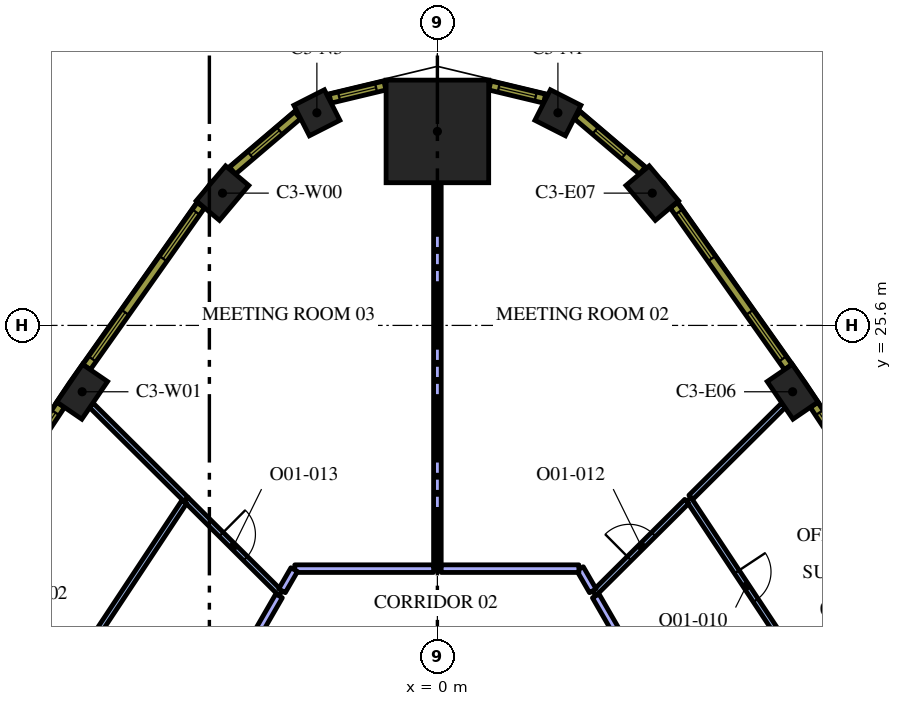
"""IFC4 building model, lengths in metres.
Left out: names, types, materials, properties, quantities, classifications, styles, units other than length and angle.
Written with IfcOpenShell. Run it as: python <this file> out.ifc"""

import sys

from ifc_helpers import new_model, si_unit, direction, frame, frame_2d, origin, origin_2d, place, context, subcontext, project, spatial, rectangle, extrude, element, fill, save


model = new_model("IFC4")
c1 = context("Model", 3, precision=1e-05, world=origin(), true_north=direction((0.0, 1.0)))
c2 = subcontext(c1, "Body", "Model", "MODEL_VIEW")
j1 = project(units=[si_unit("LENGTHUNIT", "METRE"), si_unit("PLANEANGLEUNIT", "RADIAN")], contexts=[c1])
p1 = place(None, origin())
s1 = spatial("IfcSite", under=j1, at=p1, CompositionType="ELEMENT")
p2 = place(p1, origin())
s2 = spatial("IfcBuilding", under=s1, at=p2, CompositionType="ELEMENT")
p3 = place(p2, frame((0.0, 0.0, 145.8)))
s3 = spatial("IfcBuildingStorey", under=s2, at=p3, CompositionType="ELEMENT", Elevation=145.8)
p4 = place(p3, frame((0.0, 30.704, 0.0), z_axis=(0.0, 0.0, 1.0), x_axis=(0.0, 1.0, 0.0)))
e1 = element("IfcColumn", 1, at=p4, inside=s3, PredefinedType="COLUMN", context=c2, shape_type="SweptSolid", body=[
    extrude(rectangle(XDim=2.7, YDim=2.7, at=origin_2d()), origin(), (0.0, 0.0, 1.0), 4.2),
])
for number, where, z_axis, x_axis in (
    (2, (9.348, 23.854, 0.0), (0.0, 0.0, 1.0), (-0.565, 0.825, 0.0)),
    (3, (5.654, 29.081, 0.0), (0.0, 0.0, 1.0), (-0.644, 0.765, 0.0)),
):
    element("IfcColumn", number, at=place(p3, frame(where, z_axis=z_axis, x_axis=x_axis)), inside=s3, PredefinedType="COLUMN", context=c2, shape_type="SweptSolid", body=[
        extrude(rectangle(XDim=1.2, YDim=0.8, at=origin_2d()), origin(), (0.0, 0.0, 1.0), 4.2),
    ])
for number, where, z_axis, x_axis in (
    (4, (3.171, 31.195, 0.0), (0.0, 0.0, 1.0), (-0.891, 0.453, 0.0)),
    (5, (-3.171, 31.195, 0.0), (0.0, 0.0, 1.0), (-0.891, -0.453, 0.0)),
):
    element("IfcColumn", number, at=place(p3, frame(where, z_axis=z_axis, x_axis=x_axis)), inside=s3, PredefinedType="COLUMN", context=c2, shape_type="SweptSolid", body=[
        extrude(rectangle(XDim=0.9, YDim=0.9, at=origin_2d()), origin(), (0.0, 0.0, 1.0), 4.2),
    ])
for number, where, z_axis, x_axis in (
    (6, (-5.654, 29.081, 0.0), (0.0, 0.0, 1.0), (-0.644, -0.765, 0.0)),
    (7, (-9.348, 23.854, 0.0), (0.0, 0.0, 1.0), (-0.565, -0.825, 0.0)),
):
    element("IfcColumn", number, at=place(p3, frame(where, z_axis=z_axis, x_axis=x_axis)), inside=s3, PredefinedType="COLUMN", context=c2, shape_type="SweptSolid", body=[
        extrude(rectangle(XDim=1.2, YDim=0.8, at=origin_2d()), origin(), (0.0, 0.0, 1.0), 4.2),
    ])
p5 = place(p3, frame((6.616, 21.024, 0.0), z_axis=(0.0, 0.0, 1.0), x_axis=(0.551915124006, -0.833900291338, 0.0)))
e8 = element("IfcWall", 8, at=p5, inside=s3, PredefinedType="PARTITIONING", context=c2, shape_type="SweptSolid", body=[
    extrude(rectangle(XDim=5.488, YDim=0.15, at=frame_2d((2.744, 0.0))), origin(), (0.0, 0.0, 1.0), 3.15),
])
p6 = place(p5, frame((2.288, 0.0, 0.0)))
e9 = element("IfcOpeningElement", 9, at=p6, cuts=e8, PredefinedType="OPENING", context=c2, shape_type="SweptSolid", body=[
    extrude(rectangle(XDim=0.9, YDim=2.1, at=frame_2d((0.45, 1.05))), frame((0.0, 0.085, 0.0), z_axis=(0.0, -1.0, 0.0), x_axis=(1.0, 0.0, 0.0)), (0.0, 0.0, 1.0), 0.17),
])
p7 = place(p3, frame((6.67, 21.078, 0.0), z_axis=(0.0, 0.0, 1.0), x_axis=(0.709236178776, 0.704970951681, 0.0)))
e10 = element("IfcWall", 10, at=p7, inside=s3, PredefinedType="PARTITIONING", context=c2, shape_type="SweptSolid", body=[
    extrude(rectangle(XDim=3.434, YDim=0.15, at=frame_2d((1.717, 0.0))), origin(), (0.0, 0.0, 1.0), 3.15),
])
p8 = place(p3, frame((4.128, 18.55, 0.0), z_axis=(0.0, 0.0, 1.0), x_axis=(0.709237676072, 0.704969445324, 0.0)))
e11 = element("IfcWall", 11, at=p8, inside=s3, PredefinedType="PARTITIONING", context=c2, shape_type="SweptSolid", body=[
    extrude(rectangle(XDim=3.432, YDim=0.15, at=frame_2d((1.716, 0.0))), origin(), (0.0, 0.0, 1.0), 3.15),
])
p9 = place(p8, frame((1.3, 0.0, 0.0)))
e12 = element("IfcOpeningElement", 12, at=p9, cuts=e11, PredefinedType="OPENING", context=c2, shape_type="SweptSolid", body=[
    extrude(rectangle(XDim=0.9, YDim=2.1, at=frame_2d((0.45, 1.05))), frame((0.0, 0.085, 0.0), z_axis=(0.0, -1.0, 0.0), x_axis=(1.0, 0.0, 0.0)), (0.0, 0.0, 1.0), 0.17),
])
p10 = place(p3, frame((8.611, 10.785, 0.0), z_axis=(0.0, 0.0, 1.0), x_axis=(-0.499987928593, 0.866032373102, 0.0)))
e13 = element("IfcWall", 13, at=p10, inside=s3, PredefinedType="PARTITIONING", context=c2, shape_type="SweptSolid", body=[
    extrude(rectangle(XDim=8.889, YDim=0.2, at=frame_2d((4.445, 0.0))), origin(), (0.0, 0.0, 1.0), 3.15),
])
p11 = place(p3, frame((0.0, 19.2, 0.0), z_axis=(0.0, 0.0, 1.0), x_axis=(0.0, 1.0, 0.0)))
e14 = element("IfcWall", 14, at=p11, inside=s3, PredefinedType="PARTITIONING", context=c2, shape_type="SweptSolid", body=[
    extrude(rectangle(XDim=10.154, YDim=0.2, at=frame_2d((5.077, 0.0))), origin(), (0.0, 0.0, 1.0), 3.15),
])
p12 = place(p3, frame((4.089, 18.617, 0.0), z_axis=(0.0, 0.0, 1.0), x_axis=(-0.500120377296, 0.865955892764, 0.0)))
e15 = element("IfcWall", 15, at=p12, inside=s3, PredefinedType="PARTITIONING", context=c2, shape_type="SweptSolid", body=[
    extrude(rectangle(XDim=0.673, YDim=0.2, at=frame_2d((0.336, 0.0))), origin(), (0.0, 0.0, 1.0), 3.15),
])
p13 = place(p3, frame((3.723, 19.2, 0.0), z_axis=(0.0, 0.0, 1.0), x_axis=(-1.0, 0.0, 0.0)))
e16 = element("IfcWall", 16, at=p13, inside=s3, PredefinedType="PARTITIONING", context=c2, shape_type="SweptSolid", body=[
    extrude(rectangle(XDim=3.623, YDim=0.2, at=frame_2d((1.812, 0.0))), origin(), (0.0, 0.0, 1.0), 3.15),
])
p14 = place(p3, frame((-6.613, 21.021, 0.0), z_axis=(0.0, 0.0, 1.0), x_axis=(-0.709222036241, 0.704985179497, 0.0)))
e17 = element("IfcWall", 17, at=p14, inside=s3, PredefinedType="PARTITIONING", context=c2, shape_type="SweptSolid", body=[
    extrude(rectangle(XDim=3.515, YDim=0.15, at=frame_2d((1.757, 0.0))), origin(), (0.0, 0.0, 1.0), 3.15),
])
p15 = place(p3, frame((-6.619, 21.027, 0.0), z_axis=(0.0, 0.0, 1.0), x_axis=(0.709188943058, -0.705018470002, 0.0)))
e18 = element("IfcWall", 18, at=p15, inside=s3, PredefinedType="PARTITIONING", context=c2, shape_type="SweptSolid", body=[
    extrude(rectangle(XDim=3.512, YDim=0.15, at=frame_2d((1.756, 0.0))), origin(), (0.0, 0.0, 1.0), 3.15),
])
p16 = place(p15, frame((1.312, 0.0, 0.0)))
e19 = element("IfcOpeningElement", 19, at=p16, cuts=e18, PredefinedType="OPENING", context=c2, shape_type="SweptSolid", body=[
    extrude(rectangle(XDim=0.9, YDim=2.1, at=frame_2d((0.45, 1.05))), frame((0.0, 0.085, 0.0), z_axis=(0.0, -1.0, 0.0), x_axis=(1.0, 0.0, 0.0)), (0.0, 0.0, 1.0), 0.17),
])
p17 = place(p3, frame((-0.1, 19.2, 0.0), z_axis=(0.0, 0.0, 1.0), x_axis=(-1.0, 0.0, 0.0)))
e20 = element("IfcWall", 20, at=p17, inside=s3, PredefinedType="PARTITIONING", context=c2, shape_type="SweptSolid", body=[
    extrude(rectangle(XDim=3.653, YDim=0.2, at=frame_2d((1.826, 0.0))), origin(), (0.0, 0.0, 1.0), 3.15),
])
p18 = place(p3, frame((-3.768, 19.174, 0.0), z_axis=(0.0, 0.0, 1.0), x_axis=(-0.499897828833, -0.8660843843, 0.0)))
e21 = element("IfcWall", 21, at=p18, inside=s3, PredefinedType="PARTITIONING", context=c2, shape_type="SweptSolid", body=[
    extrude(rectangle(XDim=0.643, YDim=0.2, at=frame_2d((0.321, 0.0))), origin(), (0.0, 0.0, 1.0), 3.15),
])
p19 = place(p3, frame((-6.658, 20.96, 0.0), z_axis=(0.0, 0.0, 1.0), x_axis=(-0.551907039463, -0.833905642019, 0.0)))
e22 = element("IfcWall", 22, at=p19, inside=s3, PredefinedType="PARTITIONING", context=c2, shape_type="SweptSolid", body=[
    extrude(rectangle(XDim=5.412, YDim=0.15, at=frame_2d((2.706, 0.0))), origin(), (0.0, 0.0, 1.0), 3.15),
])
p20 = place(p3, frame((-4.167, 18.483, 0.0), z_axis=(0.0, 0.0, 1.0), x_axis=(-0.499974340325, -0.866040217898, 0.0)))
e23 = element("IfcWall", 23, at=p20, inside=s3, PredefinedType="PARTITIONING", context=c2, shape_type="SweptSolid", body=[
    extrude(rectangle(XDim=8.894, YDim=0.2, at=frame_2d((4.447, 0.0))), origin(), (0.0, 0.0, 1.0), 3.15),
])
p21 = place(p3, frame((12.783, 19.171, 0.0), z_axis=(0.0, 0.0, 1.0), x_axis=(-0.551892811511, 0.833915058386, 0.0)))
e24 = element("IfcWall", 24, at=p21, inside=s3, PredefinedType="SOLIDWALL", context=c2, shape_type="SweptSolid", body=[
    extrude(rectangle(XDim=5.204, YDim=0.24, at=frame_2d((2.602, 0.0))), origin(), (0.0, 0.0, 1.0), 3.95),
])
p22 = place(p21, frame((0.248, 0.0, 0.9)))
e25 = element("IfcOpeningElement", 25, at=p22, cuts=e24, PredefinedType="OPENING", context=c2, shape_type="SweptSolid", body=[
    extrude(rectangle(XDim=1.5, YDim=2.55, at=frame_2d((0.75, 1.275))), frame((0.0, 0.13, 0.0), z_axis=(0.0, -1.0, 0.0), x_axis=(1.0, 0.0, 0.0)), (0.0, 0.0, 1.0), 0.26),
])
p23 = place(p21, frame((3.455, 0.0, 0.9)))
e26 = element("IfcOpeningElement", 26, at=p23, cuts=e24, PredefinedType="OPENING", context=c2, shape_type="SweptSolid", body=[
    extrude(rectangle(XDim=1.5, YDim=2.55, at=frame_2d((0.75, 1.275))), frame((0.0, 0.13, 0.0), z_axis=(0.0, -1.0, 0.0), x_axis=(1.0, 0.0, 0.0)), (0.0, 0.0, 1.0), 0.26),
])
p24 = place(p3, frame((9.231, 24.504, 0.0), z_axis=(0.0, 0.0, 1.0), x_axis=(-0.577115207679, 0.816662743772, 0.0)))
e27 = element("IfcWall", 27, at=p24, inside=s3, PredefinedType="SOLIDWALL", context=c2, shape_type="SweptSolid", body=[
    extrude(rectangle(XDim=5.213, YDim=0.24, at=frame_2d((2.606, 0.0))), origin(), (0.0, 0.0, 1.0), 3.95),
])
p25 = place(p24, frame((0.261, 0.0, 0.9)))
e28 = element("IfcOpeningElement", 28, at=p25, cuts=e27, PredefinedType="OPENING", context=c2, shape_type="SweptSolid", body=[
    extrude(rectangle(XDim=1.5, YDim=2.55, at=frame_2d((0.75, 1.275))), frame((0.0, 0.13, 0.0), z_axis=(0.0, -1.0, 0.0), x_axis=(1.0, 0.0, 0.0)), (0.0, 0.0, 1.0), 0.26),
])
p26 = place(p24, frame((3.492, 0.0, 0.9)))
e29 = element("IfcOpeningElement", 29, at=p26, cuts=e27, PredefinedType="OPENING", context=c2, shape_type="SweptSolid", body=[
    extrude(rectangle(XDim=1.5, YDim=2.55, at=frame_2d((0.75, 1.275))), frame((0.0, 0.13, 0.0), z_axis=(0.0, -1.0, 0.0), x_axis=(1.0, 0.0, 0.0)), (0.0, 0.0, 1.0), 0.26),
])
p27 = place(p3, frame((5.392, 29.672, 0.0), z_axis=(0.0, 0.0, 1.0), x_axis=(-0.761419744247, 0.648259186645, 0.0)))
e30 = element("IfcWall", 30, at=p27, inside=s3, PredefinedType="SOLIDWALL", context=c2, shape_type="SweptSolid", body=[
    extrude(rectangle(XDim=2.25, YDim=0.24, at=frame_2d((1.125, 0.0))), origin(), (0.0, 0.0, 1.0), 3.95),
])
p28 = place(p27, frame((0.625, 0.0, 0.9)))
e31 = element("IfcOpeningElement", 31, at=p28, cuts=e30, PredefinedType="OPENING", context=c2, shape_type="SweptSolid", body=[
    extrude(rectangle(XDim=1.0, YDim=2.55, at=frame_2d((0.5, 1.275))), frame((0.0, 0.13, 0.0), z_axis=(0.0, -1.0, 0.0), x_axis=(1.0, 0.0, 0.0)), (0.0, 0.0, 1.0), 0.26),
])
p29 = place(p3, frame((2.821, 31.566, 0.0), z_axis=(0.0, 0.0, 1.0), x_axis=(-0.972479955788, 0.232986556673, 0.0)))
e32 = element("IfcWall", 32, at=p29, inside=s3, PredefinedType="SOLIDWALL", context=c2, shape_type="SweptSolid", body=[
    extrude(rectangle(XDim=1.482, YDim=0.24, at=frame_2d((0.741, 0.0))), origin(), (0.0, 0.0, 1.0), 3.95),
])
p30 = place(p29, frame((0.241, 0.0, 0.9)))
e33 = element("IfcOpeningElement", 33, at=p30, cuts=e32, PredefinedType="OPENING", context=c2, shape_type="SweptSolid", body=[
    extrude(rectangle(XDim=1.0, YDim=2.55, at=frame_2d((0.5, 1.275))), frame((0.0, 0.13, 0.0), z_axis=(0.0, -1.0, 0.0), x_axis=(1.0, 0.0, 0.0)), (0.0, 0.0, 1.0), 0.26),
])
p31 = place(p3, frame((-1.38, 31.912, 0.0), z_axis=(0.0, 0.0, 1.0), x_axis=(-0.972479955788, -0.232986556673, 0.0)))
e34 = element("IfcWall", 34, at=p31, inside=s3, PredefinedType="SOLIDWALL", context=c2, shape_type="SweptSolid", body=[
    extrude(rectangle(XDim=1.482, YDim=0.24, at=frame_2d((0.741, 0.0))), origin(), (0.0, 0.0, 1.0), 3.95),
])
p32 = place(p31, frame((0.241, 0.0, 0.9)))
e35 = element("IfcOpeningElement", 35, at=p32, cuts=e34, PredefinedType="OPENING", context=c2, shape_type="SweptSolid", body=[
    extrude(rectangle(XDim=1.0, YDim=2.55, at=frame_2d((0.5, 1.275))), frame((0.0, 0.13, 0.0), z_axis=(0.0, -1.0, 0.0), x_axis=(1.0, 0.0, 0.0)), (0.0, 0.0, 1.0), 0.26),
])
p33 = place(p3, frame((-3.678, 31.131, 0.0), z_axis=(0.0, 0.0, 1.0), x_axis=(-0.761419744247, -0.648259186645, 0.0)))
e36 = element("IfcWall", 36, at=p33, inside=s3, PredefinedType="SOLIDWALL", context=c2, shape_type="SweptSolid", body=[
    extrude(rectangle(XDim=2.25, YDim=0.24, at=frame_2d((1.125, 0.0))), origin(), (0.0, 0.0, 1.0), 3.95),
])
p34 = place(p33, frame((0.625, 0.0, 0.9)))
e37 = element("IfcOpeningElement", 37, at=p34, cuts=e36, PredefinedType="OPENING", context=c2, shape_type="SweptSolid", body=[
    extrude(rectangle(XDim=1.0, YDim=2.55, at=frame_2d((0.5, 1.275))), frame((0.0, 0.13, 0.0), z_axis=(0.0, -1.0, 0.0), x_axis=(1.0, 0.0, 0.0)), (0.0, 0.0, 1.0), 0.26),
])
p35 = place(p3, frame((-6.223, 28.762, 0.0), z_axis=(0.0, 0.0, 1.0), x_axis=(-0.577115207679, -0.816662743772, 0.0)))
e38 = element("IfcWall", 38, at=p35, inside=s3, PredefinedType="SOLIDWALL", context=c2, shape_type="SweptSolid", body=[
    extrude(rectangle(XDim=5.213, YDim=0.24, at=frame_2d((2.606, 0.0))), origin(), (0.0, 0.0, 1.0), 3.95),
])
p36 = place(p35, frame((0.221, 0.0, 0.9)))
e39 = element("IfcOpeningElement", 39, at=p36, cuts=e38, PredefinedType="OPENING", context=c2, shape_type="SweptSolid", body=[
    extrude(rectangle(XDim=1.5, YDim=2.55, at=frame_2d((0.75, 1.275))), frame((0.0, 0.13, 0.0), z_axis=(0.0, -1.0, 0.0), x_axis=(1.0, 0.0, 0.0)), (0.0, 0.0, 1.0), 0.26),
])
p37 = place(p35, frame((3.452, 0.0, 0.9)))
e40 = element("IfcOpeningElement", 40, at=p37, cuts=e38, PredefinedType="OPENING", context=c2, shape_type="SweptSolid", body=[
    extrude(rectangle(XDim=1.5, YDim=2.55, at=frame_2d((0.75, 1.275))), frame((0.0, 0.13, 0.0), z_axis=(0.0, -1.0, 0.0), x_axis=(1.0, 0.0, 0.0)), (0.0, 0.0, 1.0), 0.26),
])
p38 = place(p3, frame((-9.911, 23.51, 0.0), z_axis=(0.0, 0.0, 1.0), x_axis=(-0.551892811511, -0.833915058386, 0.0)))
e41 = element("IfcWall", 41, at=p38, inside=s3, PredefinedType="SOLIDWALL", context=c2, shape_type="SweptSolid", body=[
    extrude(rectangle(XDim=5.204, YDim=0.24, at=frame_2d((2.602, 0.0))), origin(), (0.0, 0.0, 1.0), 3.95),
])
p39 = place(p38, frame((0.248, 0.0, 0.9)))
e42 = element("IfcOpeningElement", 42, at=p39, cuts=e41, PredefinedType="OPENING", context=c2, shape_type="SweptSolid", body=[
    extrude(rectangle(XDim=1.5, YDim=2.55, at=frame_2d((0.75, 1.275))), frame((0.0, 0.13, 0.0), z_axis=(0.0, -1.0, 0.0), x_axis=(1.0, 0.0, 0.0)), (0.0, 0.0, 1.0), 0.26),
])
p40 = place(p38, frame((3.455, 0.0, 0.9)))
e43 = element("IfcOpeningElement", 43, at=p40, cuts=e41, PredefinedType="OPENING", context=c2, shape_type="SweptSolid", body=[
    extrude(rectangle(XDim=1.5, YDim=2.55, at=frame_2d((0.75, 1.275))), frame((0.0, 0.13, 0.0), z_axis=(0.0, -1.0, 0.0), x_axis=(1.0, 0.0, 0.0)), (0.0, 0.0, 1.0), 0.26),
])
p41 = place(p6, origin())
e44 = element("IfcDoor", 44, at=p41, inside=s3, OperationType="SINGLE_SWING_LEFT", PredefinedType="DOOR", context=c2, shape_type="SweptSolid", body=[
    extrude(rectangle(XDim=0.9, YDim=2.1, at=frame_2d((0.45, 1.05))), frame((0.0, 0.025, 0.0), z_axis=(0.0, -1.0, 0.0), x_axis=(1.0, 0.0, 0.0)), (0.0, 0.0, 1.0), 0.05),
])
fill(e9, e44)
p42 = place(p9, origin())
e45 = element("IfcDoor", 45, at=p42, inside=s3, OperationType="SINGLE_SWING_RIGHT", PredefinedType="DOOR", context=c2, shape_type="SweptSolid", body=[
    extrude(rectangle(XDim=0.9, YDim=2.1, at=frame_2d((0.45, 1.05))), frame((0.0, 0.025, 0.0), z_axis=(0.0, -1.0, 0.0), x_axis=(1.0, 0.0, 0.0)), (0.0, 0.0, 1.0), 0.05),
])
fill(e12, e45)
p43 = place(p16, origin())
e46 = element("IfcDoor", 46, at=p43, inside=s3, OperationType="SINGLE_SWING_RIGHT", PredefinedType="DOOR", context=c2, shape_type="SweptSolid", body=[
    extrude(rectangle(XDim=0.9, YDim=2.1, at=frame_2d((0.45, 1.05))), frame((0.0, 0.025, 0.0), z_axis=(0.0, -1.0, 0.0), x_axis=(1.0, 0.0, 0.0)), (0.0, 0.0, 1.0), 0.05),
])
fill(e19, e46)
p44 = place(p23, origin())
e47 = element("IfcWindow", 47, at=p44, inside=s3, PartitioningType="SINGLE_PANEL", PredefinedType="WINDOW", context=c2, shape_type="SweptSolid", body=[
    extrude(rectangle(XDim=1.5, YDim=2.55, at=frame_2d((0.75, 1.275))), frame((0.0, 0.04, 0.0), z_axis=(0.0, -1.0, 0.0), x_axis=(1.0, 0.0, 0.0)), (0.0, 0.0, 1.0), 0.06),
])
fill(e26, e47)
p45 = place(p25, origin())
e48 = element("IfcWindow", 48, at=p45, inside=s3, PartitioningType="SINGLE_PANEL", PredefinedType="WINDOW", context=c2, shape_type="SweptSolid", body=[
    extrude(rectangle(XDim=1.5, YDim=2.55, at=frame_2d((0.75, 1.275))), frame((0.0, 0.04, 0.0), z_axis=(0.0, -1.0, 0.0), x_axis=(1.0, 0.0, 0.0)), (0.0, 0.0, 1.0), 0.06),
])
fill(e28, e48)
p46 = place(p26, origin())
e49 = element("IfcWindow", 49, at=p46, inside=s3, PartitioningType="SINGLE_PANEL", PredefinedType="WINDOW", context=c2, shape_type="SweptSolid", body=[
    extrude(rectangle(XDim=1.5, YDim=2.55, at=frame_2d((0.75, 1.275))), frame((0.0, 0.04, 0.0), z_axis=(0.0, -1.0, 0.0), x_axis=(1.0, 0.0, 0.0)), (0.0, 0.0, 1.0), 0.06),
])
fill(e29, e49)
p47 = place(p28, origin())
e50 = element("IfcWindow", 50, at=p47, inside=s3, PartitioningType="SINGLE_PANEL", PredefinedType="WINDOW", context=c2, shape_type="SweptSolid", body=[
    extrude(rectangle(XDim=1.0, YDim=2.55, at=frame_2d((0.5, 1.275))), frame((0.0, 0.04, 0.0), z_axis=(0.0, -1.0, 0.0), x_axis=(1.0, 0.0, 0.0)), (0.0, 0.0, 1.0), 0.06),
])
fill(e31, e50)
p48 = place(p30, origin())
e51 = element("IfcWindow", 51, at=p48, inside=s3, PartitioningType="SINGLE_PANEL", PredefinedType="WINDOW", context=c2, shape_type="SweptSolid", body=[
    extrude(rectangle(XDim=1.0, YDim=2.55, at=frame_2d((0.5, 1.275))), frame((0.0, 0.04, 0.0), z_axis=(0.0, -1.0, 0.0), x_axis=(1.0, 0.0, 0.0)), (0.0, 0.0, 1.0), 0.06),
])
fill(e33, e51)
p49 = place(p32, origin())
e52 = element("IfcWindow", 52, at=p49, inside=s3, PartitioningType="SINGLE_PANEL", PredefinedType="WINDOW", context=c2, shape_type="SweptSolid", body=[
    extrude(rectangle(XDim=1.0, YDim=2.55, at=frame_2d((0.5, 1.275))), frame((0.0, 0.04, 0.0), z_axis=(0.0, -1.0, 0.0), x_axis=(1.0, 0.0, 0.0)), (0.0, 0.0, 1.0), 0.06),
])
fill(e35, e52)
p50 = place(p34, origin())
e53 = element("IfcWindow", 53, at=p50, inside=s3, PartitioningType="SINGLE_PANEL", PredefinedType="WINDOW", context=c2, shape_type="SweptSolid", body=[
    extrude(rectangle(XDim=1.0, YDim=2.55, at=frame_2d((0.5, 1.275))), frame((0.0, 0.04, 0.0), z_axis=(0.0, -1.0, 0.0), x_axis=(1.0, 0.0, 0.0)), (0.0, 0.0, 1.0), 0.06),
])
fill(e37, e53)
p51 = place(p36, origin())
e54 = element("IfcWindow", 54, at=p51, inside=s3, PartitioningType="SINGLE_PANEL", PredefinedType="WINDOW", context=c2, shape_type="SweptSolid", body=[
    extrude(rectangle(XDim=1.5, YDim=2.55, at=frame_2d((0.75, 1.275))), frame((0.0, 0.04, 0.0), z_axis=(0.0, -1.0, 0.0), x_axis=(1.0, 0.0, 0.0)), (0.0, 0.0, 1.0), 0.06),
])
fill(e39, e54)
p52 = place(p37, origin())
e55 = element("IfcWindow", 55, at=p52, inside=s3, PartitioningType="SINGLE_PANEL", PredefinedType="WINDOW", context=c2, shape_type="SweptSolid", body=[
    extrude(rectangle(XDim=1.5, YDim=2.55, at=frame_2d((0.75, 1.275))), frame((0.0, 0.04, 0.0), z_axis=(0.0, -1.0, 0.0), x_axis=(1.0, 0.0, 0.0)), (0.0, 0.0, 1.0), 0.06),
])
fill(e40, e55)
p53 = place(p39, origin())
e56 = element("IfcWindow", 56, at=p53, inside=s3, PartitioningType="SINGLE_PANEL", PredefinedType="WINDOW", context=c2, shape_type="SweptSolid", body=[
    extrude(rectangle(XDim=1.5, YDim=2.55, at=frame_2d((0.75, 1.275))), frame((0.0, 0.04, 0.0), z_axis=(0.0, -1.0, 0.0), x_axis=(1.0, 0.0, 0.0)), (0.0, 0.0, 1.0), 0.06),
])
fill(e42, e56)
save(model, sys.argv[1])
